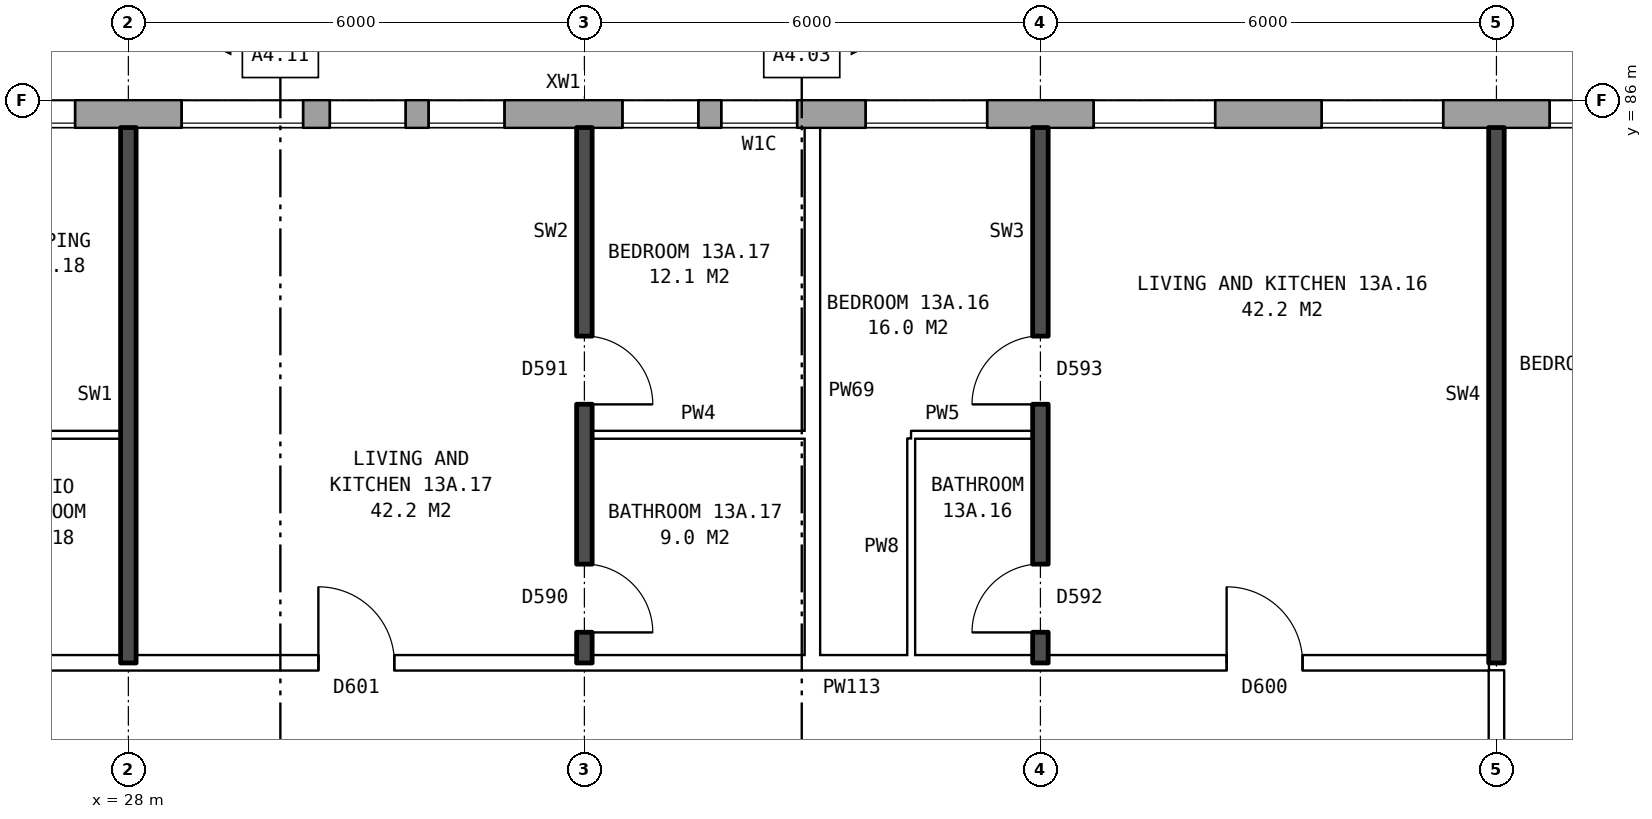
"""IFC4 building model, lengths in metres.
Left out: names, types, materials, properties, quantities, classifications, styles, units other than length and angle.
Written with IfcOpenShell. Run it as: python <this file> out.ifc"""

import sys

from ifc_helpers import new_model, si_unit, direction, frame, frame_2d, origin, place, context, subcontext, project, spatial, rectangle, extrude, element, fill, save


model = new_model("IFC4")
c1 = context("Model", 3, precision=1e-05, world=origin(), true_north=direction((0.0, 1.0)))
c2 = subcontext(c1, "Body", "Model", "MODEL_VIEW")
j1 = project(units=[si_unit("LENGTHUNIT", "METRE"), si_unit("PLANEANGLEUNIT", "RADIAN")], contexts=[c1])
p1 = place(None, origin())
s1 = spatial("IfcSite", under=j1, at=p1, CompositionType="ELEMENT")
p2 = place(p1, origin())
s2 = spatial("IfcBuilding", under=s1, at=p2, CompositionType="ELEMENT")
p3 = place(p2, frame((0.0, 0.0, 50.5)))
s3 = spatial("IfcBuildingStorey", under=s2, at=p3, CompositionType="ELEMENT", Elevation=50.5)
p4 = place(p3, frame((72.925, 85.82, 0.0), z_axis=(0.0, 0.0, 1.0), x_axis=(-1.0, 0.0, 0.0)))
e1 = element("IfcWall", 1, at=p4, inside=s3, PredefinedType="STANDARD", context=c2, shape_type="SweptSolid", body=[
    extrude(rectangle(XDim=48.351, YDim=0.36, at=frame_2d((24.175, 0.0))), origin(), (0.0, 0.0, 1.0), 2.85),
])
p5 = place(p4, frame((0.625, 0.0, 0.8)))
e2 = element("IfcOpeningElement", 2, at=p5, cuts=e1, PredefinedType="OPENING", context=c2, shape_type="SweptSolid", body=[
    extrude(rectangle(XDim=1.6, YDim=1.8, at=frame_2d((0.8, 0.9))), frame((0.0, 0.19, 0.0), z_axis=(0.0, -1.0, 0.0), x_axis=(1.0, 0.0, 0.0)), (0.0, 0.0, 1.0), 0.38),
])
p6 = place(p4, frame((3.625, 0.0, 0.8)))
e3 = element("IfcOpeningElement", 3, at=p6, cuts=e1, PredefinedType="OPENING", context=c2, shape_type="SweptSolid", body=[
    extrude(rectangle(XDim=1.6, YDim=1.8, at=frame_2d((0.8, 0.9))), frame((0.0, 0.19, 0.0), z_axis=(0.0, -1.0, 0.0), x_axis=(1.0, 0.0, 0.0)), (0.0, 0.0, 1.0), 0.38),
])
p7 = place(p4, frame((5.525, 0.0, 0.8)))
e4 = element("IfcOpeningElement", 4, at=p7, cuts=e1, PredefinedType="OPENING", context=c2, shape_type="SweptSolid", body=[
    extrude(rectangle(XDim=1.4, YDim=1.8, at=frame_2d((0.7, 0.9))), frame((0.0, 0.19, 0.0), z_axis=(0.0, -1.0, 0.0), x_axis=(1.0, 0.0, 0.0)), (0.0, 0.0, 1.0), 0.38),
])
p8 = place(p4, frame((9.225, 0.0, 0.45)))
e5 = element("IfcOpeningElement", 5, at=p8, cuts=e1, PredefinedType="OPENING", context=c2, shape_type="SweptSolid", body=[
    extrude(rectangle(XDim=1.0, YDim=0.9, at=frame_2d((0.5, 0.45))), frame((0.0, 0.19, 0.0), z_axis=(0.0, -1.0, 0.0), x_axis=(1.0, 0.0, 0.0)), (0.0, 0.0, 1.0), 0.38),
])
p9 = place(p4, frame((12.625, 0.0, 0.8)))
e6 = element("IfcOpeningElement", 6, at=p9, cuts=e1, PredefinedType="OPENING", context=c2, shape_type="SweptSolid", body=[
    extrude(rectangle(XDim=1.6, YDim=1.8, at=frame_2d((0.8, 0.9))), frame((0.0, 0.19, 0.0), z_axis=(0.0, -1.0, 0.0), x_axis=(1.0, 0.0, 0.0)), (0.0, 0.0, 1.0), 0.38),
])
p10 = place(p4, frame((15.625, 0.0, 0.8)))
e7 = element("IfcOpeningElement", 7, at=p10, cuts=e1, PredefinedType="OPENING", context=c2, shape_type="SweptSolid", body=[
    extrude(rectangle(XDim=1.6, YDim=1.8, at=frame_2d((0.8, 0.9))), frame((0.0, 0.19, 0.0), z_axis=(0.0, -1.0, 0.0), x_axis=(1.0, 0.0, 0.0)), (0.0, 0.0, 1.0), 0.38),
])
p11 = place(p4, frame((18.625, 0.0, 0.8)))
e8 = element("IfcOpeningElement", 8, at=p11, cuts=e1, PredefinedType="OPENING", context=c2, shape_type="SweptSolid", body=[
    extrude(rectangle(XDim=1.6, YDim=1.8, at=frame_2d((0.8, 0.9))), frame((0.0, 0.19, 0.0), z_axis=(0.0, -1.0, 0.0), x_axis=(1.0, 0.0, 0.0)), (0.0, 0.0, 1.0), 0.38),
])
p12 = place(p4, frame((21.625, 0.0, 0.8)))
e9 = element("IfcOpeningElement", 9, at=p12, cuts=e1, PredefinedType="OPENING", context=c2, shape_type="SweptSolid", body=[
    extrude(rectangle(XDim=1.6, YDim=1.8, at=frame_2d((0.8, 0.9))), frame((0.0, 0.19, 0.0), z_axis=(0.0, -1.0, 0.0), x_axis=(1.0, 0.0, 0.0)), (0.0, 0.0, 1.0), 0.38),
])
p13 = place(p4, frame((24.625, 0.0, 0.8)))
e10 = element("IfcOpeningElement", 10, at=p13, cuts=e1, PredefinedType="OPENING", context=c2, shape_type="SweptSolid", body=[
    extrude(rectangle(XDim=1.6, YDim=1.8, at=frame_2d((0.8, 0.9))), frame((0.0, 0.19, 0.0), z_axis=(0.0, -1.0, 0.0), x_axis=(1.0, 0.0, 0.0)), (0.0, 0.0, 1.0), 0.38),
])
p14 = place(p4, frame((27.625, 0.0, 0.8)))
e11 = element("IfcOpeningElement", 11, at=p14, cuts=e1, PredefinedType="OPENING", context=c2, shape_type="SweptSolid", body=[
    extrude(rectangle(XDim=1.6, YDim=1.8, at=frame_2d((0.8, 0.9))), frame((0.0, 0.19, 0.0), z_axis=(0.0, -1.0, 0.0), x_axis=(1.0, 0.0, 0.0)), (0.0, 0.0, 1.0), 0.38),
])
p15 = place(p4, frame((30.625, 0.0, 0.8)))
e12 = element("IfcOpeningElement", 12, at=p15, cuts=e1, PredefinedType="OPENING", context=c2, shape_type="SweptSolid", body=[
    extrude(rectangle(XDim=1.6, YDim=1.8, at=frame_2d((0.8, 0.9))), frame((0.0, 0.19, 0.0), z_axis=(0.0, -1.0, 0.0), x_axis=(1.0, 0.0, 0.0)), (0.0, 0.0, 1.0), 0.38),
])
p16 = place(p4, frame((33.625, 0.0, 0.8)))
e13 = element("IfcOpeningElement", 13, at=p16, cuts=e1, PredefinedType="OPENING", context=c2, shape_type="SweptSolid", body=[
    extrude(rectangle(XDim=1.6, YDim=1.8, at=frame_2d((0.8, 0.9))), frame((0.0, 0.19, 0.0), z_axis=(0.0, -1.0, 0.0), x_axis=(1.0, 0.0, 0.0)), (0.0, 0.0, 1.0), 0.38),
])
p17 = place(p4, frame((36.125, 0.0, 0.8)))
e14 = element("IfcOpeningElement", 14, at=p17, cuts=e1, PredefinedType="OPENING", context=c2, shape_type="SweptSolid", body=[
    extrude(rectangle(XDim=1.0, YDim=1.8, at=frame_2d((0.5, 0.9))), frame((0.0, 0.19, 0.0), z_axis=(0.0, -1.0, 0.0), x_axis=(1.0, 0.0, 0.0)), (0.0, 0.0, 1.0), 0.38),
])
p18 = place(p4, frame((39.975, 0.0, 1.7)))
e15 = element("IfcOpeningElement", 15, at=p18, cuts=e1, PredefinedType="OPENING", context=c2, shape_type="SweptSolid", body=[
    extrude(rectangle(XDim=1.0, YDim=0.9, at=frame_2d((0.5, 0.45))), frame((0.0, 0.19, 0.0), z_axis=(0.0, -1.0, 0.0), x_axis=(1.0, 0.0, 0.0)), (0.0, 0.0, 1.0), 0.38),
])
p19 = place(p4, frame((42.625, 0.0, 0.8)))
e16 = element("IfcOpeningElement", 16, at=p19, cuts=e1, PredefinedType="OPENING", context=c2, shape_type="SweptSolid", body=[
    extrude(rectangle(XDim=1.6, YDim=1.8, at=frame_2d((0.8, 0.9))), frame((0.0, 0.19, 0.0), z_axis=(0.0, -1.0, 0.0), x_axis=(1.0, 0.0, 0.0)), (0.0, 0.0, 1.0), 0.38),
])
p20 = place(p4, frame((45.625, 0.0, 0.8)))
e17 = element("IfcOpeningElement", 17, at=p20, cuts=e1, PredefinedType="OPENING", context=c2, shape_type="SweptSolid", body=[
    extrude(rectangle(XDim=1.6, YDim=1.8, at=frame_2d((0.8, 0.9))), frame((0.0, 0.19, 0.0), z_axis=(0.0, -1.0, 0.0), x_axis=(1.0, 0.0, 0.0)), (0.0, 0.0, 1.0), 0.38),
])
p21 = place(p4, frame((7.225, 0.0, 1.6)))
e18 = element("IfcOpeningElement", 18, at=p21, cuts=e1, PredefinedType="OPENING", context=c2, shape_type="SweptSolid", body=[
    extrude(rectangle(XDim=1.0, YDim=0.9, at=frame_2d((0.5, 0.45))), frame((0.0, 0.19, 0.0), z_axis=(0.0, -1.0, 0.0), x_axis=(1.0, 0.0, 0.0)), (0.0, 0.0, 1.0), 0.38),
])
p22 = place(p4, frame((10.575, 0.0, 0.45)))
e19 = element("IfcOpeningElement", 19, at=p22, cuts=e1, PredefinedType="OPENING", context=c2, shape_type="SweptSolid", body=[
    extrude(rectangle(XDim=1.2, YDim=1.8, at=frame_2d((0.6, 0.9))), frame((0.0, 0.19, 0.0), z_axis=(0.0, -1.0, 0.0), x_axis=(1.0, 0.0, 0.0)), (0.0, 0.0, 1.0), 0.38),
])
p23 = place(p4, frame((37.425, 0.0, 0.8)))
e20 = element("IfcOpeningElement", 20, at=p23, cuts=e1, PredefinedType="OPENING", context=c2, shape_type="SweptSolid", body=[
    extrude(rectangle(XDim=1.0, YDim=0.9, at=frame_2d((0.5, 0.45))), frame((0.0, 0.19, 0.0), z_axis=(0.0, -1.0, 0.0), x_axis=(1.0, 0.0, 0.0)), (0.0, 0.0, 1.0), 0.38),
])
p24 = place(p4, frame((41.275, 0.0, 0.8)))
e21 = element("IfcOpeningElement", 21, at=p24, cuts=e1, PredefinedType="OPENING", context=c2, shape_type="SweptSolid", body=[
    extrude(rectangle(XDim=1.0, YDim=1.8, at=frame_2d((0.5, 0.9))), frame((0.0, 0.19, 0.0), z_axis=(0.0, -1.0, 0.0), x_axis=(1.0, 0.0, 0.0)), (0.0, 0.0, 1.0), 0.38),
])
p25 = place(p3, frame((21.86, 78.6, 0.0), z_axis=(0.0, 0.0, 1.0), x_axis=(1.0, 0.0, 0.0)))
e22 = element("IfcWall", 22, at=p25, inside=s3, PredefinedType="PARTITIONING", context=c2, shape_type="SweptSolid", body=[
    extrude(rectangle(XDim=24.04, YDim=0.2, at=frame_2d((12.02, 0.0))), origin(), (0.0, 0.0, 1.0), 2.85),
])
p26 = place(p25, frame((20.59, 0.0, 0.0)))
e23 = element("IfcOpeningElement", 23, at=p26, cuts=e22, PredefinedType="OPENING", context=c2, shape_type="SweptSolid", body=[
    extrude(rectangle(XDim=1.0, YDim=2.1, at=frame_2d((0.5, 1.05))), frame((0.0, 0.11, 0.0), z_axis=(0.0, -1.0, 0.0), x_axis=(1.0, 0.0, 0.0)), (0.0, 0.0, 1.0), 0.22),
])
p27 = place(p25, frame((8.64, 0.0, 0.0)))
e24 = element("IfcOpeningElement", 24, at=p27, cuts=e22, PredefinedType="OPENING", context=c2, shape_type="SweptSolid", body=[
    extrude(rectangle(XDim=1.0, YDim=2.1, at=frame_2d((0.5, 1.05))), frame((0.0, 0.11, 0.0), z_axis=(0.0, -1.0, 0.0), x_axis=(1.0, 0.0, 0.0)), (0.0, 0.0, 1.0), 0.22),
])
p28 = place(p25, frame((1.37, 0.0, 0.0)))
e25 = element("IfcOpeningElement", 25, at=p28, cuts=e22, PredefinedType="OPENING", context=c2, shape_type="SweptSolid", body=[
    extrude(rectangle(XDim=1.0, YDim=2.1, at=frame_2d((0.5, 1.05))), frame((0.0, 0.11, 0.0), z_axis=(0.0, -1.0, 0.0), x_axis=(1.0, 0.0, 0.0)), (0.0, 0.0, 1.0), 0.22),
])
p29 = place(p3, frame((25.6, 81.6, 0.0), z_axis=(0.0, 0.0, 1.0), x_axis=(1.0, 0.0, 0.0)))
e26 = element("IfcWall", 26, at=p29, inside=s3, PredefinedType="PARTITIONING", context=c2, shape_type="SweptSolid", body=[
    extrude(rectangle(XDim=2.3, YDim=0.1, at=frame_2d((1.15, 0.0))), origin(), (0.0, 0.0, 1.0), 2.85),
])
p30 = place(p3, frame((34.1, 81.6, 0.0), z_axis=(0.0, 0.0, 1.0), x_axis=(1.0, 0.0, 0.0)))
e27 = element("IfcWall", 27, at=p30, inside=s3, PredefinedType="PARTITIONING", context=c2, shape_type="SweptSolid", body=[
    extrude(rectangle(XDim=2.8, YDim=0.1, at=frame_2d((1.4, 0.0))), origin(), (0.0, 0.0, 1.0), 2.85),
])
p31 = place(p3, frame((38.3, 81.6, 0.0), z_axis=(0.0, 0.0, 1.0), x_axis=(1.0, 0.0, 0.0)))
e28 = element("IfcWall", 28, at=p31, inside=s3, PredefinedType="PARTITIONING", context=c2, shape_type="SweptSolid", body=[
    extrude(rectangle(XDim=1.6, YDim=0.1, at=frame_2d((0.8, 0.0))), origin(), (0.0, 0.0, 1.0), 2.85),
])
p32 = place(p3, frame((28.0, 78.6, 0.0), z_axis=(0.0, 0.0, 1.0), x_axis=(0.0, 1.0, 0.0)))
e29 = element("IfcWall", 29, at=p32, inside=s3, PredefinedType="SOLIDWALL", context=c2, shape_type="SweptSolid", body=[
    extrude(rectangle(XDim=7.04, YDim=0.2, at=frame_2d((3.52, 0.0))), origin(), (0.0, 0.0, 1.0), 2.85),
])
p33 = place(p3, frame((34.0, 78.6, 0.0), z_axis=(0.0, 0.0, 1.0), x_axis=(0.0, 1.0, 0.0)))
e30 = element("IfcWall", 30, at=p33, inside=s3, PredefinedType="SOLIDWALL", context=c2, shape_type="SweptSolid", body=[
    extrude(rectangle(XDim=7.04, YDim=0.2, at=frame_2d((3.52, 0.0))), origin(), (0.0, 0.0, 1.0), 2.85),
])
p34 = place(p33, frame((3.4, 0.0, 0.0)))
e31 = element("IfcOpeningElement", 31, at=p34, cuts=e30, PredefinedType="OPENING", context=c2, shape_type="SweptSolid", body=[
    extrude(rectangle(XDim=0.9, YDim=2.1, at=frame_2d((0.45, 1.05))), frame((0.0, 0.11, 0.0), z_axis=(0.0, -1.0, 0.0), x_axis=(1.0, 0.0, 0.0)), (0.0, 0.0, 1.0), 0.22),
])
p35 = place(p33, frame((0.4, 0.0, 0.0)))
e32 = element("IfcOpeningElement", 32, at=p35, cuts=e30, PredefinedType="OPENING", context=c2, shape_type="SweptSolid", body=[
    extrude(rectangle(XDim=0.9, YDim=2.1, at=frame_2d((0.45, 1.05))), frame((0.0, 0.11, 0.0), z_axis=(0.0, -1.0, 0.0), x_axis=(1.0, 0.0, 0.0)), (0.0, 0.0, 1.0), 0.22),
])
p36 = place(p3, frame((37.0, 78.7, 0.0), z_axis=(0.0, 0.0, 1.0), x_axis=(0.0, 1.0, 0.0)))
e33 = element("IfcWall", 33, at=p36, inside=s3, PredefinedType="PARTITIONING", context=c2, shape_type="SweptSolid", body=[
    extrude(rectangle(XDim=6.94, YDim=0.2, at=frame_2d((3.47, 0.0))), origin(), (0.0, 0.0, 1.0), 2.85),
])
p37 = place(p3, frame((38.3, 78.7, 0.0), z_axis=(0.0, 0.0, 1.0), x_axis=(0.0, 1.0, 0.0)))
e34 = element("IfcWall", 34, at=p37, inside=s3, PredefinedType="PARTITIONING", context=c2, shape_type="SweptSolid", body=[
    extrude(rectangle(XDim=2.85, YDim=0.1, at=frame_2d((1.425, 0.0))), origin(), (0.0, 0.0, 1.0), 2.85),
])
p38 = place(p3, frame((40.0, 78.6, 0.0), z_axis=(0.0, 0.0, 1.0), x_axis=(0.0, 1.0, 0.0)))
e35 = element("IfcWall", 35, at=p38, inside=s3, PredefinedType="SOLIDWALL", context=c2, shape_type="SweptSolid", body=[
    extrude(rectangle(XDim=7.04, YDim=0.2, at=frame_2d((3.52, 0.0))), origin(), (0.0, 0.0, 1.0), 2.85),
])
p39 = place(p38, frame((3.4, 0.0, 0.0)))
e36 = element("IfcOpeningElement", 36, at=p39, cuts=e35, PredefinedType="OPENING", context=c2, shape_type="SweptSolid", body=[
    extrude(rectangle(XDim=0.9, YDim=2.1, at=frame_2d((0.45, 1.05))), frame((0.0, 0.11, 0.0), z_axis=(0.0, -1.0, 0.0), x_axis=(1.0, 0.0, 0.0)), (0.0, 0.0, 1.0), 0.22),
])
p40 = place(p38, frame((0.4, 0.0, 0.0)))
e37 = element("IfcOpeningElement", 37, at=p40, cuts=e35, PredefinedType="OPENING", context=c2, shape_type="SweptSolid", body=[
    extrude(rectangle(XDim=0.9, YDim=2.1, at=frame_2d((0.45, 1.05))), frame((0.0, 0.11, 0.0), z_axis=(0.0, -1.0, 0.0), x_axis=(1.0, 0.0, 0.0)), (0.0, 0.0, 1.0), 0.22),
])
p41 = place(p3, frame((46.0, 76.3, 0.0), z_axis=(0.0, 0.0, 1.0), x_axis=(0.0, 1.0, 0.0)))
e38 = element("IfcWall", 38, at=p41, inside=s3, PredefinedType="PARTITIONING", context=c2, shape_type="SweptSolid", body=[
    extrude(rectangle(XDim=2.2, YDim=0.2, at=frame_2d((1.1, 0.0))), origin(), (0.0, 0.0, 1.0), 2.85),
])
p42 = place(p3, frame((46.0, 78.6, 0.0), z_axis=(0.0, 0.0, 1.0), x_axis=(0.0, 1.0, 0.0)))
e39 = element("IfcWall", 39, at=p42, inside=s3, PredefinedType="SOLIDWALL", context=c2, shape_type="SweptSolid", body=[
    extrude(rectangle(XDim=7.04, YDim=0.2, at=frame_2d((3.52, 0.0))), origin(), (0.0, 0.0, 1.0), 2.85),
])
p43 = place(p13, origin())
e40 = element("IfcWindow", 40, at=p43, inside=s3, PartitioningType="SINGLE_PANEL", PredefinedType="WINDOW", context=c2, shape_type="SweptSolid", body=[
    extrude(rectangle(XDim=1.6, YDim=1.8, at=frame_2d((0.8, 0.9))), frame((0.0, 0.15, 0.0), z_axis=(0.0, -1.0, 0.0), x_axis=(1.0, 0.0, 0.0)), (0.0, 0.0, 1.0), 0.06),
])
fill(e10, e40)
p44 = place(p14, origin())
e41 = element("IfcWindow", 41, at=p44, inside=s3, PartitioningType="SINGLE_PANEL", PredefinedType="WINDOW", context=c2, shape_type="SweptSolid", body=[
    extrude(rectangle(XDim=1.6, YDim=1.8, at=frame_2d((0.8, 0.9))), frame((0.0, 0.15, 0.0), z_axis=(0.0, -1.0, 0.0), x_axis=(1.0, 0.0, 0.0)), (0.0, 0.0, 1.0), 0.06),
])
fill(e11, e41)
p45 = place(p15, origin())
e42 = element("IfcWindow", 42, at=p45, inside=s3, PartitioningType="SINGLE_PANEL", PredefinedType="WINDOW", context=c2, shape_type="SweptSolid", body=[
    extrude(rectangle(XDim=1.6, YDim=1.8, at=frame_2d((0.8, 0.9))), frame((0.0, 0.15, 0.0), z_axis=(0.0, -1.0, 0.0), x_axis=(1.0, 0.0, 0.0)), (0.0, 0.0, 1.0), 0.06),
])
fill(e12, e42)
p46 = place(p16, origin())
e43 = element("IfcWindow", 43, at=p46, inside=s3, PartitioningType="SINGLE_PANEL", PredefinedType="WINDOW", context=c2, shape_type="SweptSolid", body=[
    extrude(rectangle(XDim=1.6, YDim=1.8, at=frame_2d((0.8, 0.9))), frame((0.0, 0.15, 0.0), z_axis=(0.0, -1.0, 0.0), x_axis=(1.0, 0.0, 0.0)), (0.0, 0.0, 1.0), 0.06),
])
fill(e13, e43)
p47 = place(p17, origin())
e44 = element("IfcWindow", 44, at=p47, inside=s3, PartitioningType="SINGLE_PANEL", PredefinedType="WINDOW", context=c2, shape_type="SweptSolid", body=[
    extrude(rectangle(XDim=1.0, YDim=1.8, at=frame_2d((0.5, 0.9))), frame((0.0, 0.15, 0.0), z_axis=(0.0, -1.0, 0.0), x_axis=(1.0, 0.0, 0.0)), (0.0, 0.0, 1.0), 0.06),
])
fill(e14, e44)
p48 = place(p18, origin())
e45 = element("IfcWindow", 45, at=p48, inside=s3, PartitioningType="SINGLE_PANEL", PredefinedType="WINDOW", context=c2, shape_type="SweptSolid", body=[
    extrude(rectangle(XDim=1.0, YDim=0.9, at=frame_2d((0.5, 0.45))), frame((0.0, 0.15, 0.0), z_axis=(0.0, -1.0, 0.0), x_axis=(1.0, 0.0, 0.0)), (0.0, 0.0, 1.0), 0.06),
])
fill(e15, e45)
p49 = place(p19, origin())
e46 = element("IfcWindow", 46, at=p49, inside=s3, PartitioningType="SINGLE_PANEL", PredefinedType="WINDOW", context=c2, shape_type="SweptSolid", body=[
    extrude(rectangle(XDim=1.6, YDim=1.8, at=frame_2d((0.8, 0.9))), frame((0.0, 0.15, 0.0), z_axis=(0.0, -1.0, 0.0), x_axis=(1.0, 0.0, 0.0)), (0.0, 0.0, 1.0), 0.06),
])
fill(e16, e46)
p50 = place(p20, origin())
e47 = element("IfcWindow", 47, at=p50, inside=s3, PartitioningType="SINGLE_PANEL", PredefinedType="WINDOW", context=c2, shape_type="SweptSolid", body=[
    extrude(rectangle(XDim=1.6, YDim=1.8, at=frame_2d((0.8, 0.9))), frame((0.0, 0.15, 0.0), z_axis=(0.0, -1.0, 0.0), x_axis=(1.0, 0.0, 0.0)), (0.0, 0.0, 1.0), 0.06),
])
fill(e17, e47)
p51 = place(p39, origin())
e48 = element("IfcDoor", 48, at=p51, inside=s3, OperationType="SINGLE_SWING_LEFT", PredefinedType="DOOR", context=c2, shape_type="SweptSolid", body=[
    extrude(rectangle(XDim=0.9, YDim=2.1, at=frame_2d((0.45, 1.05))), frame((0.0, 0.025, 0.0), z_axis=(0.0, -1.0, 0.0), x_axis=(1.0, 0.0, 0.0)), (0.0, 0.0, 1.0), 0.05),
])
fill(e36, e48)
p52 = place(p26, origin())
e49 = element("IfcDoor", 49, at=p52, inside=s3, OperationType="SINGLE_SWING_LEFT", PredefinedType="DOOR", context=c2, shape_type="SweptSolid", body=[
    extrude(rectangle(XDim=1.0, YDim=2.1, at=frame_2d((0.5, 1.05))), frame((0.0, 0.025, 0.0), z_axis=(0.0, -1.0, 0.0), x_axis=(1.0, 0.0, 0.0)), (0.0, 0.0, 1.0), 0.05),
])
fill(e23, e49)
p53 = place(p40, origin())
e50 = element("IfcDoor", 50, at=p53, inside=s3, OperationType="SINGLE_SWING_LEFT", PredefinedType="DOOR", context=c2, shape_type="SweptSolid", body=[
    extrude(rectangle(XDim=0.9, YDim=2.1, at=frame_2d((0.45, 1.05))), frame((0.0, 0.025, 0.0), z_axis=(0.0, -1.0, 0.0), x_axis=(1.0, 0.0, 0.0)), (0.0, 0.0, 1.0), 0.05),
])
fill(e37, e50)
p54 = place(p34, frame((0.9, 0.0, 0.0), z_axis=(0.0, 0.0, 1.0), x_axis=(-1.0, 0.0, 0.0)))
e51 = element("IfcDoor", 51, at=p54, inside=s3, OperationType="SINGLE_SWING_RIGHT", PredefinedType="DOOR", context=c2, shape_type="SweptSolid", body=[
    extrude(rectangle(XDim=0.9, YDim=2.1, at=frame_2d((0.45, 1.05))), frame((0.0, 0.025, 0.0), z_axis=(0.0, -1.0, 0.0), x_axis=(1.0, 0.0, 0.0)), (0.0, 0.0, 1.0), 0.05),
])
fill(e31, e51)
p55 = place(p27, origin())
e52 = element("IfcDoor", 52, at=p55, inside=s3, OperationType="SINGLE_SWING_LEFT", PredefinedType="DOOR", context=c2, shape_type="SweptSolid", body=[
    extrude(rectangle(XDim=1.0, YDim=2.1, at=frame_2d((0.5, 1.05))), frame((0.0, 0.025, 0.0), z_axis=(0.0, -1.0, 0.0), x_axis=(1.0, 0.0, 0.0)), (0.0, 0.0, 1.0), 0.05),
])
fill(e24, e52)
p56 = place(p35, frame((0.9, 0.0, 0.0), z_axis=(0.0, 0.0, 1.0), x_axis=(-1.0, 0.0, 0.0)))
e53 = element("IfcDoor", 53, at=p56, inside=s3, OperationType="SINGLE_SWING_RIGHT", PredefinedType="DOOR", context=c2, shape_type="SweptSolid", body=[
    extrude(rectangle(XDim=0.9, YDim=2.1, at=frame_2d((0.45, 1.05))), frame((0.0, 0.025, 0.0), z_axis=(0.0, -1.0, 0.0), x_axis=(1.0, 0.0, 0.0)), (0.0, 0.0, 1.0), 0.05),
])
fill(e32, e53)
p57 = place(p23, origin())
e54 = element("IfcWindow", 54, at=p57, inside=s3, PartitioningType="SINGLE_PANEL", PredefinedType="WINDOW", context=c2, shape_type="SweptSolid", body=[
    extrude(rectangle(XDim=1.0, YDim=0.9, at=frame_2d((0.5, 0.45))), frame((0.0, 0.15, 0.0), z_axis=(0.0, -1.0, 0.0), x_axis=(1.0, 0.0, 0.0)), (0.0, 0.0, 1.0), 0.06),
])
fill(e20, e54)
p58 = place(p24, origin())
e55 = element("IfcWindow", 55, at=p58, inside=s3, PartitioningType="SINGLE_PANEL", PredefinedType="WINDOW", context=c2, shape_type="SweptSolid", body=[
    extrude(rectangle(XDim=1.0, YDim=1.8, at=frame_2d((0.5, 0.9))), frame((0.0, 0.15, 0.0), z_axis=(0.0, -1.0, 0.0), x_axis=(1.0, 0.0, 0.0)), (0.0, 0.0, 1.0), 0.06),
])
fill(e21, e55)
save(model, sys.argv[1])
